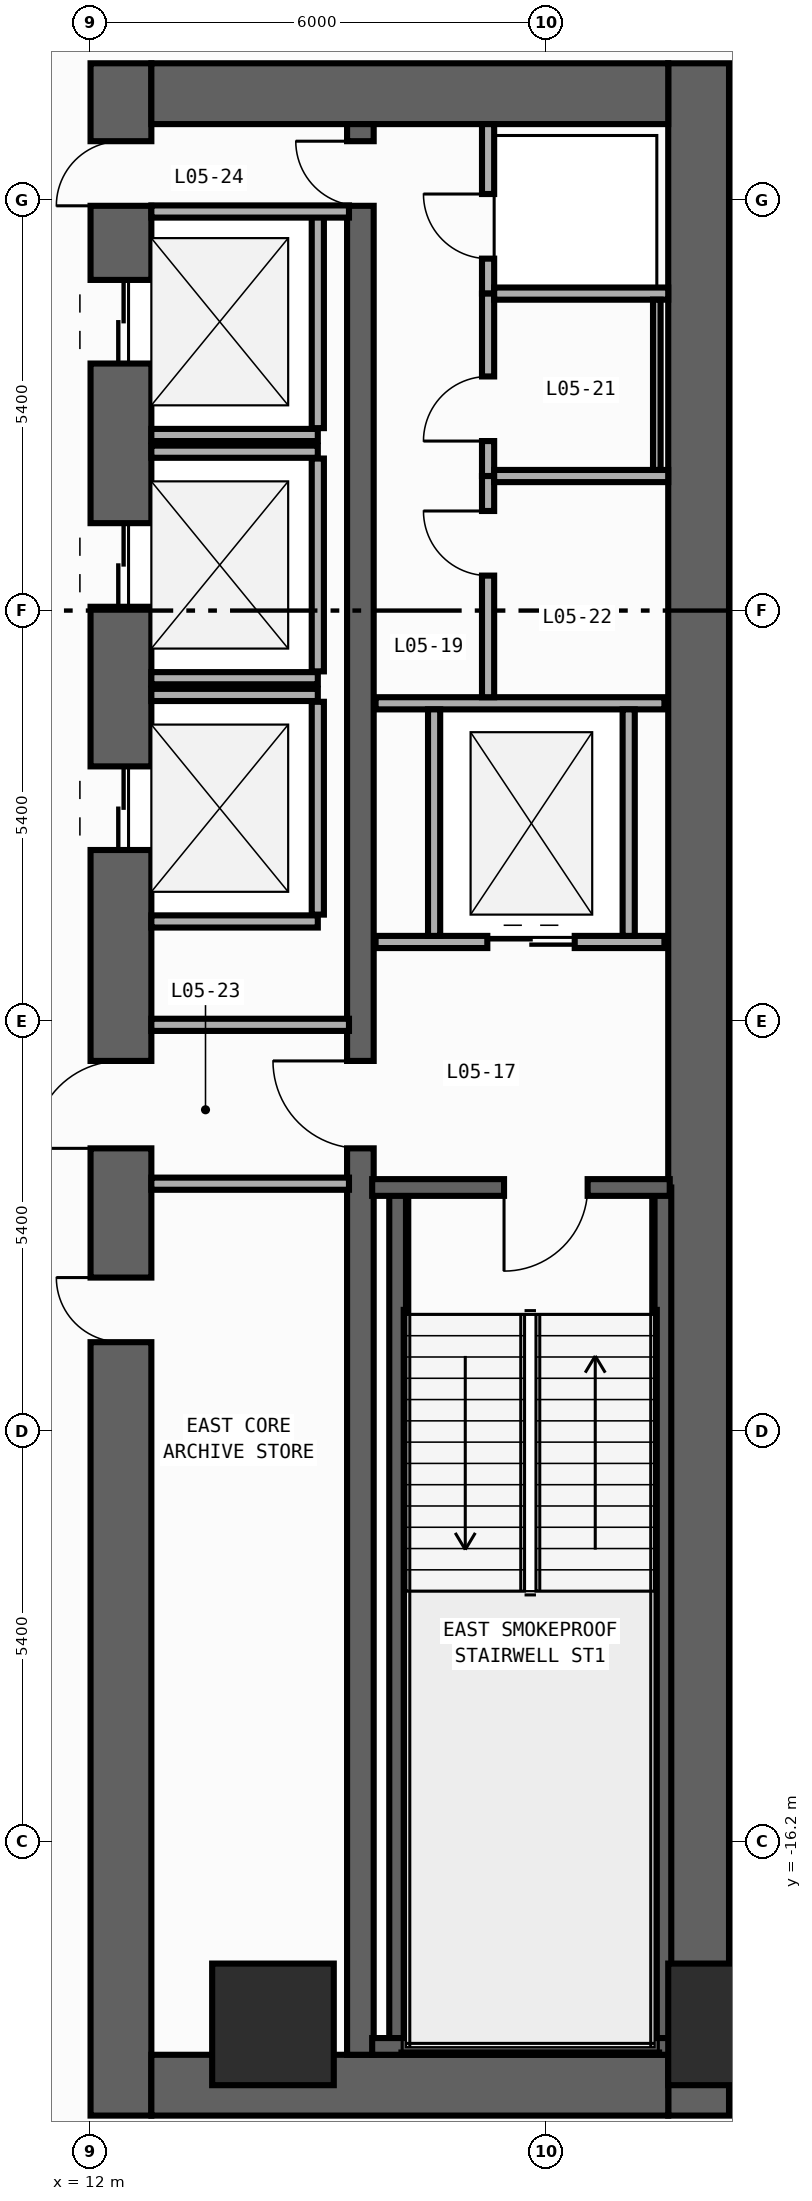
"""IFC4 building model, lengths in metres.
Left out: names, types, materials, properties, quantities, classifications, styles, units other than length and angle.
Written with IfcOpenShell. Run it as: python <this file> out.ifc"""

import sys

from ifc_helpers import new_model, si_unit, direction, frame, frame_2d, origin, origin_2d, place, context, subcontext, project, spatial, rectangle, extrude, element, fill, save


model = new_model("IFC4")
c1 = context("Model", 3, precision=1e-05, world=origin(), true_north=direction((0.0, 1.0)))
c2 = subcontext(c1, "Body", "Model", "MODEL_VIEW")
j1 = project(units=[si_unit("LENGTHUNIT", "METRE"), si_unit("PLANEANGLEUNIT", "RADIAN")], contexts=[c1])
p1 = place(None, origin())
s1 = spatial("IfcSite", under=j1, at=p1, CompositionType="ELEMENT")
p2 = place(p1, origin())
s2 = spatial("IfcBuilding", under=s1, at=p2, CompositionType="ELEMENT")
p3 = place(p2, frame((0.0, 0.0, 21.0)))
s3 = spatial("IfcBuildingStorey", under=s2, at=p3, CompositionType="ELEMENT", Elevation=21.0)
p4 = place(p3, frame((12.4, -19.8, 0.0), z_axis=(0.0, 0.0, 1.0), x_axis=(0.0, 1.0, 0.0)))
e1 = element("IfcWall", 1, at=p4, inside=s3, PredefinedType="SHEAR", context=c2, shape_type="SweptSolid", body=[
    extrude(rectangle(XDim=27.0, YDim=0.8, at=frame_2d((13.5, 0.0))), origin(), (0.0, 0.0, 1.0), 4.74),
])
p5 = place(p4, frame((23.05, 0.0, 0.0)))
e2 = element("IfcOpeningElement", 2, at=p5, cuts=e1, PredefinedType="OPENING", context=c2, shape_type="SweptSolid", body=[
    extrude(rectangle(XDim=1.1, YDim=2.2, at=frame_2d((0.55, 1.1))), frame((0.0, 0.41, 0.0), z_axis=(0.0, -1.0, 0.0), x_axis=(1.0, 0.0, 0.0)), (0.0, 0.0, 1.0), 0.82),
])
p6 = place(p4, frame((19.85, 0.0, 0.0)))
e3 = element("IfcOpeningElement", 3, at=p6, cuts=e1, PredefinedType="OPENING", context=c2, shape_type="SweptSolid", body=[
    extrude(rectangle(XDim=1.1, YDim=2.2, at=frame_2d((0.55, 1.1))), frame((0.0, 0.41, 0.0), z_axis=(0.0, -1.0, 0.0), x_axis=(1.0, 0.0, 0.0)), (0.0, 0.0, 1.0), 0.82),
])
p7 = place(p4, frame((16.65, 0.0, 0.0)))
e4 = element("IfcOpeningElement", 4, at=p7, cuts=e1, PredefinedType="OPENING", context=c2, shape_type="SweptSolid", body=[
    extrude(rectangle(XDim=1.1, YDim=2.2, at=frame_2d((0.55, 1.1))), frame((0.0, 0.41, 0.0), z_axis=(0.0, -1.0, 0.0), x_axis=(1.0, 0.0, 0.0)), (0.0, 0.0, 1.0), 0.82),
])
p8 = place(p4, frame((10.175, 0.0, 0.0)))
e5 = element("IfcOpeningElement", 5, at=p8, cuts=e1, PredefinedType="OPENING", context=c2, shape_type="SweptSolid", body=[
    extrude(rectangle(XDim=0.85, YDim=2.1, at=frame_2d((0.425, 1.05))), frame((0.0, 0.41, 0.0), z_axis=(0.0, -1.0, 0.0), x_axis=(1.0, 0.0, 0.0)), (0.0, 0.0, 1.0), 0.82),
])
p9 = place(p4, frame((12.725, 0.0, 0.0)))
e6 = element("IfcOpeningElement", 6, at=p9, cuts=e1, PredefinedType="OPENING", context=c2, shape_type="SweptSolid", body=[
    extrude(rectangle(XDim=1.15, YDim=2.2, at=frame_2d((0.575, 1.1))), frame((0.0, 0.41, 0.0), z_axis=(0.0, -1.0, 0.0), x_axis=(1.0, 0.0, 0.0)), (0.0, 0.0, 1.0), 0.82),
])
p10 = place(p4, frame((25.125, 0.0, 0.0)))
e7 = element("IfcOpeningElement", 7, at=p10, cuts=e1, PredefinedType="OPENING", context=c2, shape_type="SweptSolid", body=[
    extrude(rectangle(XDim=0.85, YDim=2.1, at=frame_2d((0.425, 1.05))), frame((0.0, 0.41, 0.0), z_axis=(0.0, -1.0, 0.0), x_axis=(1.0, 0.0, 0.0)), (0.0, 0.0, 1.0), 0.82),
])
p11 = place(p3, frame((20.0, -19.8, 0.0), z_axis=(0.0, 0.0, 1.0), x_axis=(0.0, 1.0, 0.0)))
e8 = element("IfcWall", 8, at=p11, inside=s3, PredefinedType="SHEAR", context=c2, shape_type="SweptSolid", body=[
    extrude(rectangle(XDim=27.0, YDim=0.8, at=frame_2d((13.5, 0.0))), origin(), (0.0, 0.0, 1.0), 4.74),
])
for number, where, z_axis, x_axis in (
    (9, (12.8, -19.4, 0.0), (0.0, 0.0, 1.0), (1.0, 0.0, 0.0)),
    (10, (12.8, 6.8, 0.0), (0.0, 0.0, 1.0), (1.0, 0.0, 0.0)),
):
    element("IfcWall", number, at=place(p3, frame(where, z_axis=z_axis, x_axis=x_axis)), inside=s3, PredefinedType="SHEAR", context=c2, shape_type="SweptSolid", body=[
        extrude(rectangle(XDim=6.8, YDim=0.8, at=frame_2d((3.4, 0.0))), origin(), (0.0, 0.0, 1.0), 4.74),
    ])
p12 = place(p3, frame((15.55, -19.0, 0.0), z_axis=(0.0, 0.0, 1.0), x_axis=(0.0, 1.0, 0.0)))
e11 = element("IfcWall", 11, at=p12, inside=s3, PredefinedType="SHEAR", context=c2, shape_type="SweptSolid", body=[
    extrude(rectangle(XDim=25.4, YDim=0.35, at=frame_2d((12.7, 0.0))), origin(), (0.0, 0.0, 1.0), 4.74),
])
p13 = place(p12, frame((11.925, 0.0, 0.0)))
e12 = element("IfcOpeningElement", 12, at=p13, cuts=e11, PredefinedType="OPENING", context=c2, shape_type="SweptSolid", body=[
    extrude(rectangle(XDim=1.15, YDim=2.2, at=frame_2d((0.575, 1.1))), frame((0.0, 0.185, 0.0), z_axis=(0.0, -1.0, 0.0), x_axis=(1.0, 0.0, 0.0)), (0.0, 0.0, 1.0), 0.37),
])
p14 = place(p12, frame((24.325, 0.0, 0.0)))
e13 = element("IfcOpeningElement", 13, at=p14, cuts=e11, PredefinedType="OPENING", context=c2, shape_type="SweptSolid", body=[
    extrude(rectangle(XDim=0.85, YDim=2.1, at=frame_2d((0.425, 1.05))), frame((0.0, 0.185, 0.0), z_axis=(0.0, -1.0, 0.0), x_axis=(1.0, 0.0, 0.0)), (0.0, 0.0, 1.0), 0.37),
])
for number, where, z_axis, x_axis in (
    (14, (16.04, -18.89, 0.0), (0.0, 0.0, 1.0), (0.0, 1.0, 0.0)),
    (15, (19.53, -18.89, 0.0), (0.0, 0.0, 1.0), (0.0, 1.0, 0.0)),
):
    element("IfcWall", number, at=place(p3, frame(where, z_axis=z_axis, x_axis=x_axis)), inside=s3, PredefinedType="SHEAR", context=c2, shape_type="SweptSolid", body=[
        extrude(rectangle(XDim=11.3, YDim=0.22, at=frame_2d((5.65, 0.0))), origin(), (0.0, 0.0, 1.0), 4.74),
    ])
p15 = place(p3, frame((15.705, -18.89, 0.0), z_axis=(0.0, 0.0, 1.0), x_axis=(1.0, 0.0, 0.0)))
e16 = element("IfcWall", 16, at=p15, inside=s3, PredefinedType="SHEAR", context=c2, shape_type="SweptSolid", body=[
    extrude(rectangle(XDim=3.915, YDim=0.22, at=frame_2d((1.958, 0.0))), origin(), (0.0, 0.0, 1.0), 4.74),
])
p16 = place(p3, frame((19.62, -7.59, 0.0), z_axis=(0.0, 0.0, 1.0), x_axis=(-1.0, 0.0, 0.0)))
e17 = element("IfcWall", 17, at=p16, inside=s3, PredefinedType="SHEAR", context=c2, shape_type="SweptSolid", body=[
    extrude(rectangle(XDim=3.915, YDim=0.22, at=frame_2d((1.958, 0.0))), origin(), (0.0, 0.0, 1.0), 4.74),
])
p17 = place(p16, frame((1.08, 0.0, 0.0)))
e18 = element("IfcOpeningElement", 18, at=p17, cuts=e17, PredefinedType="OPENING", context=c2, shape_type="SweptSolid", body=[
    extrude(rectangle(XDim=1.1, YDim=2.2, at=frame_2d((0.55, 1.1))), frame((0.0, 0.12, 0.0), z_axis=(0.0, -1.0, 0.0), x_axis=(1.0, 0.0, 0.0)), (0.0, 0.0, 1.0), 0.24),
])
for number, where, z_axis, x_axis in (
    (19, (20.4, -18.6, 0.0), (0.0, 0.0, 1.0), (1.0, 0.0, 0.0)),
    (20, (14.4, -18.6, 0.0), (0.0, 0.0, 1.0), (1.0, 0.0, 0.0)),
):
    element("IfcColumn", number, at=place(p3, frame(where, z_axis=z_axis, x_axis=x_axis)), inside=s3, PredefinedType="COLUMN", context=c2, shape_type="SweptSolid", body=[
        extrude(rectangle(XDim=1.6, YDim=1.6, at=origin_2d()), origin(), (0.0, 0.0, 1.0), 5.0),
    ])
p18 = place(p3, frame((12.8, 2.31, 0.0), z_axis=(0.0, 0.0, 1.0), x_axis=(1.0, 0.0, 0.0)))
e21 = element("IfcWall", 21, at=p18, inside=s3, PredefinedType="STANDARD", context=c2, shape_type="SweptSolid", body=[
    extrude(rectangle(XDim=2.19, YDim=0.16, at=frame_2d((1.095, 0.0))), origin(), (0.0, 0.0, 1.0), 4.74),
])
p19 = place(p3, frame((14.99, 2.4, 0.0), z_axis=(0.0, 0.0, 1.0), x_axis=(0.0, 1.0, 0.0)))
e22 = element("IfcWall", 22, at=p19, inside=s3, PredefinedType="STANDARD", context=c2, shape_type="SweptSolid", body=[
    extrude(rectangle(XDim=2.8, YDim=0.16, at=frame_2d((1.4, 0.0))), origin(), (0.0, 0.0, 1.0), 4.74),
])
for number, where, z_axis, x_axis in (
    (23, (12.8, -0.89, 0.0), (0.0, 0.0, 1.0), (1.0, 0.0, 0.0)),
    (24, (12.8, 2.09, 0.0), (0.0, 0.0, 1.0), (1.0, 0.0, 0.0)),
):
    element("IfcWall", number, at=place(p3, frame(where, z_axis=z_axis, x_axis=x_axis)), inside=s3, PredefinedType="STANDARD", context=c2, shape_type="SweptSolid", body=[
        extrude(rectangle(XDim=2.19, YDim=0.16, at=frame_2d((1.095, 0.0))), origin(), (0.0, 0.0, 1.0), 4.74),
    ])
p20 = place(p3, frame((14.99, -0.8, 0.0), z_axis=(0.0, 0.0, 1.0), x_axis=(0.0, 1.0, 0.0)))
e25 = element("IfcWall", 25, at=p20, inside=s3, PredefinedType="STANDARD", context=c2, shape_type="SweptSolid", body=[
    extrude(rectangle(XDim=2.8, YDim=0.16, at=frame_2d((1.4, 0.0))), origin(), (0.0, 0.0, 1.0), 4.74),
])
for number, where, z_axis, x_axis in (
    (26, (12.8, -4.09, 0.0), (0.0, 0.0, 1.0), (1.0, 0.0, 0.0)),
    (27, (12.8, -1.11, 0.0), (0.0, 0.0, 1.0), (1.0, 0.0, 0.0)),
):
    element("IfcWall", number, at=place(p3, frame(where, z_axis=z_axis, x_axis=x_axis)), inside=s3, PredefinedType="STANDARD", context=c2, shape_type="SweptSolid", body=[
        extrude(rectangle(XDim=2.19, YDim=0.16, at=frame_2d((1.095, 0.0))), origin(), (0.0, 0.0, 1.0), 4.74),
    ])
p21 = place(p3, frame((14.99, -4.0, 0.0), z_axis=(0.0, 0.0, 1.0), x_axis=(0.0, 1.0, 0.0)))
e28 = element("IfcWall", 28, at=p21, inside=s3, PredefinedType="STANDARD", context=c2, shape_type="SweptSolid", body=[
    extrude(rectangle(XDim=2.8, YDim=0.16, at=frame_2d((1.4, 0.0))), origin(), (0.0, 0.0, 1.0), 4.74),
])
p22 = place(p3, frame((15.75, -4.36, 0.0), z_axis=(0.0, 0.0, 1.0), x_axis=(1.0, 0.0, 0.0)))
e29 = element("IfcWall", 29, at=p22, inside=s3, PredefinedType="STANDARD", context=c2, shape_type="SweptSolid", body=[
    extrude(rectangle(XDim=3.8, YDim=0.16, at=frame_2d((1.9, 0.0))), origin(), (0.0, 0.0, 1.0), 4.74),
])
p23 = place(p22, frame((1.47, 0.0, 0.0)))
e30 = element("IfcOpeningElement", 30, at=p23, cuts=e29, PredefinedType="OPENING", context=c2, shape_type="SweptSolid", body=[
    extrude(rectangle(XDim=1.15, YDim=2.2, at=frame_2d((0.575, 1.1))), frame((0.0, 0.09, 0.0), z_axis=(0.0, -1.0, 0.0), x_axis=(1.0, 0.0, 0.0)), (0.0, 0.0, 1.0), 0.18),
])
p24 = place(p3, frame((15.75, -1.22, 0.0), z_axis=(0.0, 0.0, 1.0), x_axis=(1.0, 0.0, 0.0)))
e31 = element("IfcWall", 31, at=p24, inside=s3, PredefinedType="STANDARD", context=c2, shape_type="SweptSolid", body=[
    extrude(rectangle(XDim=3.8, YDim=0.16, at=frame_2d((1.9, 0.0))), origin(), (0.0, 0.0, 1.0), 4.74),
])
for number, where, z_axis, x_axis in (
    (32, (16.52, -4.28, 0.0), (0.0, 0.0, 1.0), (0.0, 1.0, 0.0)),
    (33, (19.08, -4.28, 0.0), (0.0, 0.0, 1.0), (0.0, 1.0, 0.0)),
):
    element("IfcWall", number, at=place(p3, frame(where, z_axis=z_axis, x_axis=x_axis)), inside=s3, PredefinedType="STANDARD", context=c2, shape_type="SweptSolid", body=[
        extrude(rectangle(XDim=2.98, YDim=0.16, at=frame_2d((1.49, 0.0))), origin(), (0.0, 0.0, 1.0), 4.74),
    ])
for number, where, z_axis, x_axis in (
    (34, (12.8, -5.45, 0.0), (0.0, 0.0, 1.0), (1.0, 0.0, 0.0)),
    (35, (12.8, -7.54, 0.0), (0.0, 0.0, 1.0), (1.0, 0.0, 0.0)),
    (36, (12.8, 5.25, 0.0), (0.0, 0.0, 1.0), (1.0, 0.0, 0.0)),
):
    element("IfcWall", number, at=place(p3, frame(where, z_axis=z_axis, x_axis=x_axis)), inside=s3, PredefinedType="STANDARD", context=c2, shape_type="SweptSolid", body=[
        extrude(rectangle(XDim=2.6, YDim=0.16, at=frame_2d((1.3, 0.0))), origin(), (0.0, 0.0, 1.0), 4.74),
    ])
p25 = place(p3, frame((17.23, 4.17, 0.0), z_axis=(0.0, 0.0, 1.0), x_axis=(0.0, 1.0, 0.0)))
e37 = element("IfcWall", 37, at=p25, inside=s3, PredefinedType="PARTITIONING", context=c2, shape_type="SweptSolid", body=[
    extrude(rectangle(XDim=2.23, YDim=0.16, at=frame_2d((1.115, 0.0))), origin(), (0.0, 0.0, 1.0), 4.74),
])
p26 = place(p25, frame((0.46, 0.0, 0.0)))
e38 = element("IfcOpeningElement", 38, at=p26, cuts=e37, PredefinedType="OPENING", context=c2, shape_type="SweptSolid", body=[
    extrude(rectangle(XDim=0.85, YDim=2.1, at=frame_2d((0.425, 1.05))), frame((0.0, 0.09, 0.0), z_axis=(0.0, -1.0, 0.0), x_axis=(1.0, 0.0, 0.0)), (0.0, 0.0, 1.0), 0.18),
])
p27 = place(p3, frame((17.23, 1.77, 0.0), z_axis=(0.0, 0.0, 1.0), x_axis=(0.0, 1.0, 0.0)))
e39 = element("IfcWall", 39, at=p27, inside=s3, PredefinedType="PARTITIONING", context=c2, shape_type="SweptSolid", body=[
    extrude(rectangle(XDim=2.4, YDim=0.16, at=frame_2d((1.2, 0.0))), origin(), (0.0, 0.0, 1.0), 4.74),
])
p28 = place(p27, frame((0.46, 0.0, 0.0)))
e40 = element("IfcOpeningElement", 40, at=p28, cuts=e39, PredefinedType="OPENING", context=c2, shape_type="SweptSolid", body=[
    extrude(rectangle(XDim=0.85, YDim=2.1, at=frame_2d((0.425, 1.05))), frame((0.0, 0.09, 0.0), z_axis=(0.0, -1.0, 0.0), x_axis=(1.0, 0.0, 0.0)), (0.0, 0.0, 1.0), 0.18),
])
p29 = place(p3, frame((17.23, -1.14, 0.0), z_axis=(0.0, 0.0, 1.0), x_axis=(0.0, 1.0, 0.0)))
e41 = element("IfcWall", 41, at=p29, inside=s3, PredefinedType="PARTITIONING", context=c2, shape_type="SweptSolid", body=[
    extrude(rectangle(XDim=2.91, YDim=0.16, at=frame_2d((1.455, 0.0))), origin(), (0.0, 0.0, 1.0), 4.74),
])
p30 = place(p29, frame((1.6, 0.0, 0.0)))
e42 = element("IfcOpeningElement", 42, at=p30, cuts=e41, PredefinedType="OPENING", context=c2, shape_type="SweptSolid", body=[
    extrude(rectangle(XDim=0.85, YDim=2.1, at=frame_2d((0.425, 1.05))), frame((0.0, 0.09, 0.0), z_axis=(0.0, -1.0, 0.0), x_axis=(1.0, 0.0, 0.0)), (0.0, 0.0, 1.0), 0.18),
])
for number, where, z_axis, x_axis in (
    (43, (17.31, 4.17, 0.0), (0.0, 0.0, 1.0), (1.0, 0.0, 0.0)),
    (44, (17.31, 1.77, 0.0), (0.0, 0.0, 1.0), (1.0, 0.0, 0.0)),
):
    element("IfcWall", number, at=place(p3, frame(where, z_axis=z_axis, x_axis=x_axis)), inside=s3, PredefinedType="PARTITIONING", context=c2, shape_type="SweptSolid", body=[
        extrude(rectangle(XDim=2.29, YDim=0.16, at=frame_2d((1.145, 0.0))), origin(), (0.0, 0.0, 1.0), 4.74),
    ])
p31 = place(p3, frame((19.45, 4.09, 0.0), z_axis=(0.0, 0.0, 1.0), x_axis=(0.0, -1.0, 0.0)))
e45 = element("IfcWall", 45, at=p31, inside=s3, PredefinedType="PARTITIONING", context=c2, shape_type="SweptSolid", body=[
    extrude(rectangle(XDim=2.24, YDim=0.1, at=frame_2d((1.12, 0.0))), origin(), (0.0, 0.0, 1.0), 4.74),
])
p32 = place(p17, origin())
e46 = element("IfcDoor", 46, at=p32, inside=s3, OperationType="SINGLE_SWING_RIGHT", PredefinedType="DOOR", context=c2, shape_type="SweptSolid", body=[
    extrude(rectangle(XDim=1.1, YDim=2.2, at=frame_2d((0.55, 1.1))), frame((0.0, 0.025, 0.0), z_axis=(0.0, -1.0, 0.0), x_axis=(1.0, 0.0, 0.0)), (0.0, 0.0, 1.0), 0.05),
])
fill(e18, e46)
p33 = place(p5, origin())
e47 = element("IfcDoor", 47, at=p33, inside=s3, OperationType="DOUBLE_DOOR_SLIDING", PredefinedType="DOOR", context=c2, shape_type="SweptSolid", body=[
    extrude(rectangle(XDim=1.1, YDim=2.2, at=frame_2d((0.55, 1.1))), frame((0.0, 0.025, 0.0), z_axis=(0.0, -1.0, 0.0), x_axis=(1.0, 0.0, 0.0)), (0.0, 0.0, 1.0), 0.05),
])
fill(e2, e47)
p34 = place(p6, origin())
e48 = element("IfcDoor", 48, at=p34, inside=s3, OperationType="DOUBLE_DOOR_SLIDING", PredefinedType="DOOR", context=c2, shape_type="SweptSolid", body=[
    extrude(rectangle(XDim=1.1, YDim=2.2, at=frame_2d((0.55, 1.1))), frame((0.0, 0.025, 0.0), z_axis=(0.0, -1.0, 0.0), x_axis=(1.0, 0.0, 0.0)), (0.0, 0.0, 1.0), 0.05),
])
fill(e3, e48)
p35 = place(p7, origin())
e49 = element("IfcDoor", 49, at=p35, inside=s3, OperationType="DOUBLE_DOOR_SLIDING", PredefinedType="DOOR", context=c2, shape_type="SweptSolid", body=[
    extrude(rectangle(XDim=1.1, YDim=2.2, at=frame_2d((0.55, 1.1))), frame((0.0, 0.025, 0.0), z_axis=(0.0, -1.0, 0.0), x_axis=(1.0, 0.0, 0.0)), (0.0, 0.0, 1.0), 0.05),
])
fill(e4, e49)
p36 = place(p8, origin())
e50 = element("IfcDoor", 50, at=p36, inside=s3, OperationType="SINGLE_SWING_RIGHT", PredefinedType="DOOR", context=c2, shape_type="SweptSolid", body=[
    extrude(rectangle(XDim=0.85, YDim=2.1, at=frame_2d((0.425, 1.05))), frame((0.0, 0.025, 0.0), z_axis=(0.0, -1.0, 0.0), x_axis=(1.0, 0.0, 0.0)), (0.0, 0.0, 1.0), 0.05),
])
fill(e5, e50)
p37 = place(p9, origin())
e51 = element("IfcDoor", 51, at=p37, inside=s3, OperationType="SINGLE_SWING_LEFT", PredefinedType="DOOR", context=c2, shape_type="SweptSolid", body=[
    extrude(rectangle(XDim=1.15, YDim=2.2, at=frame_2d((0.575, 1.1))), frame((0.0, 0.025, 0.0), z_axis=(0.0, -1.0, 0.0), x_axis=(1.0, 0.0, 0.0)), (0.0, 0.0, 1.0), 0.05),
])
fill(e6, e51)
p38 = place(p13, origin())
e52 = element("IfcDoor", 52, at=p38, inside=s3, OperationType="SINGLE_SWING_RIGHT", PredefinedType="DOOR", context=c2, shape_type="SweptSolid", body=[
    extrude(rectangle(XDim=1.15, YDim=2.2, at=frame_2d((0.575, 1.1))), frame((0.0, 0.025, 0.0), z_axis=(0.0, -1.0, 0.0), x_axis=(1.0, 0.0, 0.0)), (0.0, 0.0, 1.0), 0.05),
])
fill(e12, e52)
p39 = place(p10, origin())
e53 = element("IfcDoor", 53, at=p39, inside=s3, OperationType="SINGLE_SWING_LEFT", PredefinedType="DOOR", context=c2, shape_type="SweptSolid", body=[
    extrude(rectangle(XDim=0.85, YDim=2.1, at=frame_2d((0.425, 1.05))), frame((0.0, 0.025, 0.0), z_axis=(0.0, -1.0, 0.0), x_axis=(1.0, 0.0, 0.0)), (0.0, 0.0, 1.0), 0.05),
])
fill(e7, e53)
p40 = place(p14, origin())
e54 = element("IfcDoor", 54, at=p40, inside=s3, OperationType="SINGLE_SWING_RIGHT", PredefinedType="DOOR", context=c2, shape_type="SweptSolid", body=[
    extrude(rectangle(XDim=0.85, YDim=2.1, at=frame_2d((0.425, 1.05))), frame((0.0, 0.025, 0.0), z_axis=(0.0, -1.0, 0.0), x_axis=(1.0, 0.0, 0.0)), (0.0, 0.0, 1.0), 0.05),
])
fill(e13, e54)
p41 = place(p23, origin())
e55 = element("IfcDoor", 55, at=p41, inside=s3, OperationType="DOUBLE_DOOR_SLIDING", PredefinedType="DOOR", context=c2, shape_type="SweptSolid", body=[
    extrude(rectangle(XDim=1.15, YDim=2.2, at=frame_2d((0.575, 1.1))), frame((0.0, 0.025, 0.0), z_axis=(0.0, -1.0, 0.0), x_axis=(1.0, 0.0, 0.0)), (0.0, 0.0, 1.0), 0.05),
])
fill(e30, e55)
p42 = place(p26, origin())
e56 = element("IfcDoor", 56, at=p42, inside=s3, OperationType="SINGLE_SWING_RIGHT", PredefinedType="DOOR", context=c2, shape_type="SweptSolid", body=[
    extrude(rectangle(XDim=0.85, YDim=2.1, at=frame_2d((0.425, 1.05))), frame((0.0, 0.025, 0.0), z_axis=(0.0, -1.0, 0.0), x_axis=(1.0, 0.0, 0.0)), (0.0, 0.0, 1.0), 0.05),
])
fill(e38, e56)
p43 = place(p28, origin())
e57 = element("IfcDoor", 57, at=p43, inside=s3, OperationType="SINGLE_SWING_LEFT", PredefinedType="DOOR", context=c2, shape_type="SweptSolid", body=[
    extrude(rectangle(XDim=0.85, YDim=2.1, at=frame_2d((0.425, 1.05))), frame((0.0, 0.025, 0.0), z_axis=(0.0, -1.0, 0.0), x_axis=(1.0, 0.0, 0.0)), (0.0, 0.0, 1.0), 0.05),
])
fill(e40, e57)
p44 = place(p30, origin())
e58 = element("IfcDoor", 58, at=p44, inside=s3, OperationType="SINGLE_SWING_RIGHT", PredefinedType="DOOR", context=c2, shape_type="SweptSolid", body=[
    extrude(rectangle(XDim=0.85, YDim=2.1, at=frame_2d((0.425, 1.05))), frame((0.0, 0.025, 0.0), z_axis=(0.0, -1.0, 0.0), x_axis=(1.0, 0.0, 0.0)), (0.0, 0.0, 1.0), 0.05),
])
fill(e42, e58)
save(model, sys.argv[1])
